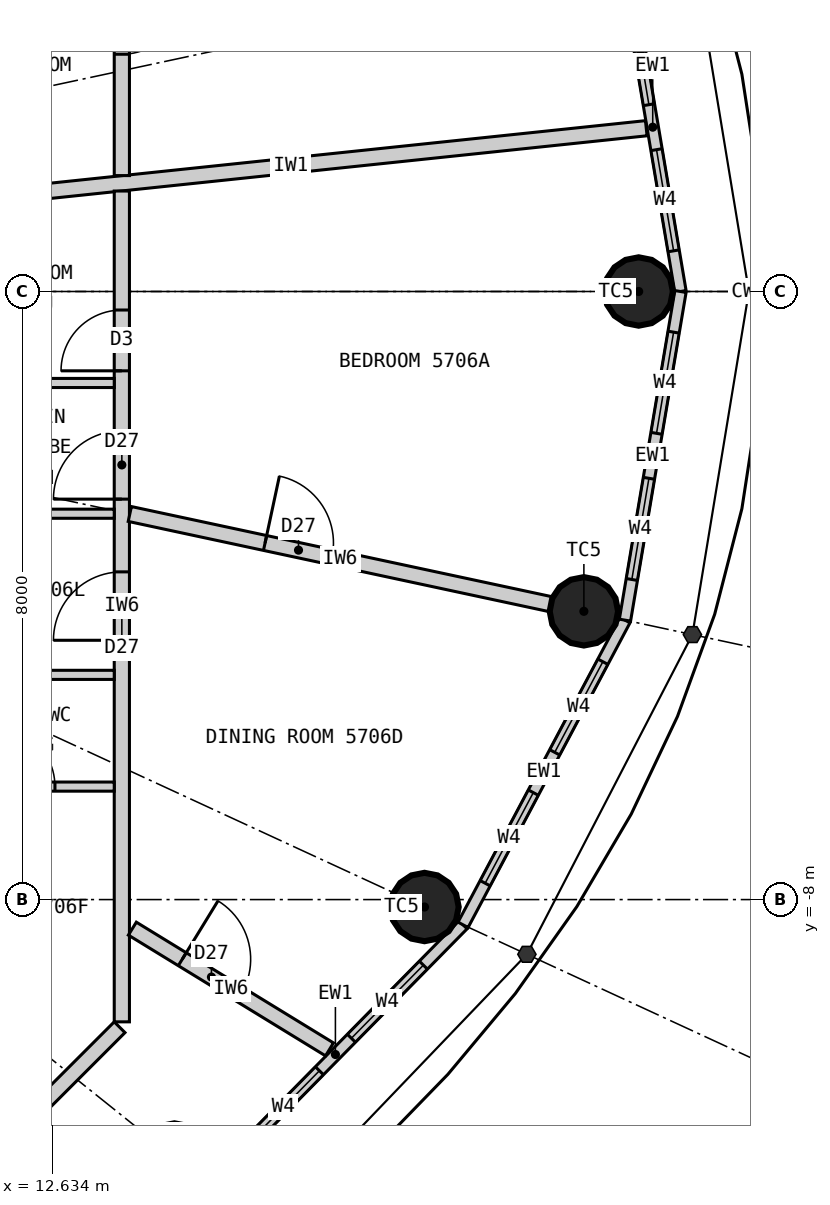
"""IFC4 building model, lengths in metres.
Left out: names, types, materials, properties, quantities, classifications, styles, units other than length and angle.
Written with IfcOpenShell. Run it as: python <this file> out.ifc"""

import sys

from ifc_helpers import new_model, si_unit, direction, frame, frame_2d, origin, origin_2d, place, context, subcontext, project, spatial, rectangle, circle, extrude, element, fill, save


model = new_model("IFC4")
c1 = context("Model", 3, precision=1e-05, world=origin(), true_north=direction((0.0, 1.0)))
c2 = subcontext(c1, "Body", "Model", "MODEL_VIEW")
j1 = project(units=[si_unit("LENGTHUNIT", "METRE"), si_unit("PLANEANGLEUNIT", "RADIAN")], contexts=[c1])
p1 = place(None, origin())
s1 = spatial("IfcSite", under=j1, at=p1, CompositionType="ELEMENT")
p2 = place(p1, origin())
s2 = spatial("IfcBuilding", under=s1, at=p2, CompositionType="ELEMENT")
p3 = place(p2, frame((0.0, 0.0, 212.7)))
s3 = spatial("IfcBuildingStorey", under=s2, at=p3, CompositionType="ELEMENT", Elevation=212.7)
for number, where, z_axis, x_axis in (
    (1, (20.35, 0.0, 0.0), (0.0, 0.0, 1.0), (1.0, 0.0, 0.0)),
    (2, (14.241, -11.393, 0.0), (0.0, 0.0, 1.0), (1.0, 0.0, 0.0)),
    (3, (17.532, -8.098, 0.0), (0.0, 0.0, 1.0), (1.0, 0.0, 0.0)),
    (4, (19.629, -4.208, 0.0), (0.0, 0.0, 1.0), (1.0, 0.0, 0.0)),
):
    element("IfcColumn", number, at=place(p3, frame(where, z_axis=z_axis, x_axis=x_axis)), inside=s3, PredefinedType="COLUMN", context=c2, shape_type="SweptSolid", body=[
        extrude(circle(Radius=0.45, at=origin_2d()), origin(), (0.0, 0.0, 1.0), 3.3),
    ])
p4 = place(p3, frame((20.9, 0.0, 0.0), z_axis=(0.0, 0.0, 1.0), x_axis=(-0.166538513568, 0.986034950445, 0.0)))
e5 = element("IfcWall", 5, at=p4, inside=s3, PredefinedType="ELEMENTEDWALL", context=c2, shape_type="SweptSolid", body=[
    extrude(rectangle(XDim=4.385, YDim=0.15, at=frame_2d((2.192, 0.0))), origin(), (0.0, 0.0, 1.0), 3.12),
])
p5 = place(p4, frame((0.542, 0.0, 0.9)))
e6 = element("IfcOpeningElement", 6, at=p5, cuts=e5, PredefinedType="OPENING", context=c2, shape_type="SweptSolid", body=[
    extrude(rectangle(XDim=1.35, YDim=1.9, at=frame_2d((0.675, 0.95))), frame((0.0, 0.085, 0.0), z_axis=(0.0, -1.0, 0.0), x_axis=(1.0, 0.0, 0.0)), (0.0, 0.0, 1.0), 0.17),
])
p6 = place(p4, frame((2.492, 0.0, 0.9)))
e7 = element("IfcOpeningElement", 7, at=p6, cuts=e5, PredefinedType="OPENING", context=c2, shape_type="SweptSolid", body=[
    extrude(rectangle(XDim=1.35, YDim=1.9, at=frame_2d((0.675, 0.95))), frame((0.0, 0.085, 0.0), z_axis=(0.0, -1.0, 0.0), x_axis=(1.0, 0.0, 0.0)), (0.0, 0.0, 1.0), 0.17),
])
p7 = place(p3, frame((14.68, -11.744, 0.0), z_axis=(0.0, 0.0, 1.0), x_axis=(0.701527379618, 0.712642501993, 0.0)))
e8 = element("IfcWall", 8, at=p7, inside=s3, PredefinedType="ELEMENTEDWALL", context=c2, shape_type="SweptSolid", body=[
    extrude(rectangle(XDim=4.788, YDim=0.15, at=frame_2d((2.394, 0.0))), origin(), (0.0, 0.0, 1.0), 3.12),
])
p8 = place(p7, frame((0.744, 0.0, 0.9)))
e9 = element("IfcOpeningElement", 9, at=p8, cuts=e8, PredefinedType="OPENING", context=c2, shape_type="SweptSolid", body=[
    extrude(rectangle(XDim=1.35, YDim=1.9, at=frame_2d((0.675, 0.95))), frame((0.0, 0.085, 0.0), z_axis=(0.0, -1.0, 0.0), x_axis=(1.0, 0.0, 0.0)), (0.0, 0.0, 1.0), 0.17),
])
p9 = place(p7, frame((2.694, 0.0, 0.9)))
e10 = element("IfcOpeningElement", 10, at=p9, cuts=e8, PredefinedType="OPENING", context=c2, shape_type="SweptSolid", body=[
    extrude(rectangle(XDim=1.35, YDim=1.9, at=frame_2d((0.675, 0.95))), frame((0.0, 0.085, 0.0), z_axis=(0.0, -1.0, 0.0), x_axis=(1.0, 0.0, 0.0)), (0.0, 0.0, 1.0), 0.17),
])
p10 = place(p3, frame((18.04, -8.332, 0.0), z_axis=(0.0, 0.0, 1.0), x_axis=(0.469256152955, 0.883062094597, 0.0)))
e11 = element("IfcWall", 11, at=p10, inside=s3, PredefinedType="ELEMENTEDWALL", context=c2, shape_type="SweptSolid", body=[
    extrude(rectangle(XDim=4.539, YDim=0.15, at=frame_2d((2.27, 0.0))), origin(), (0.0, 0.0, 1.0), 3.12),
])
p11 = place(p10, frame((0.62, 0.0, 0.9)))
e12 = element("IfcOpeningElement", 12, at=p11, cuts=e11, PredefinedType="OPENING", context=c2, shape_type="SweptSolid", body=[
    extrude(rectangle(XDim=1.35, YDim=1.9, at=frame_2d((0.675, 0.95))), frame((0.0, 0.085, 0.0), z_axis=(0.0, -1.0, 0.0), x_axis=(1.0, 0.0, 0.0)), (0.0, 0.0, 1.0), 0.17),
])
p12 = place(p10, frame((2.57, 0.0, 0.9)))
e13 = element("IfcOpeningElement", 13, at=p12, cuts=e11, PredefinedType="OPENING", context=c2, shape_type="SweptSolid", body=[
    extrude(rectangle(XDim=1.35, YDim=1.9, at=frame_2d((0.675, 0.95))), frame((0.0, 0.085, 0.0), z_axis=(0.0, -1.0, 0.0), x_axis=(1.0, 0.0, 0.0)), (0.0, 0.0, 1.0), 0.17),
])
p13 = place(p3, frame((20.17, -4.323, 0.0), z_axis=(0.0, 0.0, 1.0), x_axis=(0.166538513568, 0.986034950445, 0.0)))
e14 = element("IfcWall", 14, at=p13, inside=s3, PredefinedType="ELEMENTEDWALL", context=c2, shape_type="SweptSolid", body=[
    extrude(rectangle(XDim=4.385, YDim=0.15, at=frame_2d((2.192, 0.0))), origin(), (0.0, 0.0, 1.0), 3.12),
])
p14 = place(p13, frame((0.542, 0.0, 0.9)))
e15 = element("IfcOpeningElement", 15, at=p14, cuts=e14, PredefinedType="OPENING", context=c2, shape_type="SweptSolid", body=[
    extrude(rectangle(XDim=1.35, YDim=1.9, at=frame_2d((0.675, 0.95))), frame((0.0, 0.085, 0.0), z_axis=(0.0, -1.0, 0.0), x_axis=(1.0, 0.0, 0.0)), (0.0, 0.0, 1.0), 0.17),
])
p15 = place(p13, frame((2.492, 0.0, 0.9)))
e16 = element("IfcOpeningElement", 16, at=p15, cuts=e14, PredefinedType="OPENING", context=c2, shape_type="SweptSolid", body=[
    extrude(rectangle(XDim=1.35, YDim=1.9, at=frame_2d((0.675, 0.95))), frame((0.0, 0.085, 0.0), z_axis=(0.0, -1.0, 0.0), x_axis=(1.0, 0.0, 0.0)), (0.0, 0.0, 1.0), 0.17),
])
p16 = place(p3, frame((11.1, 1.166, 0.0), z_axis=(0.0, 0.0, 1.0), x_axis=(0.994527487125, 0.104475247564, 0.0)))
e17 = element("IfcWall", 17, at=p16, inside=s3, PredefinedType="PARTITIONING", context=c2, shape_type="SweptSolid", body=[
    extrude(rectangle(XDim=9.401, YDim=0.2, at=frame_2d((4.701, 0.0))), origin(), (0.0, 0.0, 1.0), 2.47),
])
p17 = place(p3, frame((13.55, 1.525, 0.0), z_axis=(0.0, 0.0, 1.0), x_axis=(0.0, 1.0, 0.0)))
e18 = element("IfcWall", 18, at=p17, inside=s3, PredefinedType="PARTITIONING", context=c2, shape_type="SweptSolid", body=[
    extrude(rectangle(XDim=8.084, YDim=0.2, at=frame_2d((4.042, 0.0))), origin(), (0.0, 0.0, 1.0), 3.12),
])
p18 = place(p17, frame((1.597, 0.0, 0.0)))
e19 = element("IfcOpeningElement", 19, at=p18, cuts=e18, PredefinedType="OPENING", context=c2, shape_type="SweptSolid", body=[
    extrude(rectangle(XDim=0.8, YDim=2.1, at=frame_2d((0.4, 1.05))), frame((0.0, 0.11, 0.0), z_axis=(0.0, -1.0, 0.0), x_axis=(1.0, 0.0, 0.0)), (0.0, 0.0, 1.0), 0.22),
])
p19 = place(p17, frame((3.57, 0.0, 0.0)))
e20 = element("IfcOpeningElement", 20, at=p19, cuts=e18, PredefinedType="OPENING", context=c2, shape_type="SweptSolid", body=[
    extrude(rectangle(XDim=0.9, YDim=2.1, at=frame_2d((0.45, 1.05))), frame((0.0, 0.11, 0.0), z_axis=(0.0, -1.0, 0.0), x_axis=(1.0, 0.0, 0.0)), (0.0, 0.0, 1.0), 0.22),
])
p20 = place(p3, frame((10.679, -12.521, 0.0), z_axis=(0.0, 0.0, 1.0), x_axis=(0.707106781187, 0.707106781187, 0.0)))
e21 = element("IfcWall", 21, at=p20, inside=s3, PredefinedType="PARTITIONING", context=c2, shape_type="SweptSolid", body=[
    extrude(rectangle(XDim=4.019, YDim=0.2, at=frame_2d((2.009, 0.0))), origin(), (0.0, 0.0, 1.0), 3.12),
])
p21 = place(p3, frame((13.55, -9.609, 0.0), z_axis=(0.0, 0.0, 1.0), x_axis=(0.0, 1.0, 0.0)))
e22 = element("IfcWall", 22, at=p21, inside=s3, PredefinedType="PARTITIONING", context=c2, shape_type="SweptSolid", body=[
    extrude(rectangle(XDim=10.93, YDim=0.2, at=frame_2d((5.465, 0.0))), origin(), (0.0, 0.0, 1.0), 3.12),
])
p22 = place(p21, frame((5.02, 0.0, 0.0)))
e23 = element("IfcOpeningElement", 23, at=p22, cuts=e22, PredefinedType="OPENING", context=c2, shape_type="SweptSolid", body=[
    extrude(rectangle(XDim=0.9, YDim=2.1, at=frame_2d((0.45, 1.05))), frame((0.0, 0.11, 0.0), z_axis=(0.0, -1.0, 0.0), x_axis=(1.0, 0.0, 0.0)), (0.0, 0.0, 1.0), 0.22),
])
p23 = place(p21, frame((6.877, 0.0, 0.0)))
e24 = element("IfcOpeningElement", 24, at=p23, cuts=e22, PredefinedType="OPENING", context=c2, shape_type="SweptSolid", body=[
    extrude(rectangle(XDim=0.9, YDim=2.1, at=frame_2d((0.45, 1.05))), frame((0.0, 0.11, 0.0), z_axis=(0.0, -1.0, 0.0), x_axis=(1.0, 0.0, 0.0)), (0.0, 0.0, 1.0), 0.22),
])
p24 = place(p21, frame((8.565, 0.0, 0.0)))
e25 = element("IfcOpeningElement", 25, at=p24, cuts=e22, PredefinedType="OPENING", context=c2, shape_type="SweptSolid", body=[
    extrude(rectangle(XDim=0.8, YDim=2.1, at=frame_2d((0.4, 1.05))), frame((0.0, 0.11, 0.0), z_axis=(0.0, -1.0, 0.0), x_axis=(1.0, 0.0, 0.0)), (0.0, 0.0, 1.0), 0.22),
])
p25 = place(p3, frame((13.688, -8.382, 0.0), z_axis=(0.0, 0.0, 1.0), x_axis=(0.852783459586, -0.522264656144, 0.0)))
e26 = element("IfcWall", 26, at=p25, inside=s3, PredefinedType="PARTITIONING", context=c2, shape_type="SweptSolid", body=[
    extrude(rectangle(XDim=3.042, YDim=0.2, at=frame_2d((1.521, 0.0))), origin(), (0.0, 0.0, 1.0), 3.12),
])
p26 = place(p25, frame((0.77, 0.0, 0.0)))
e27 = element("IfcOpeningElement", 27, at=p26, cuts=e26, PredefinedType="OPENING", context=c2, shape_type="SweptSolid", body=[
    extrude(rectangle(XDim=0.9, YDim=2.1, at=frame_2d((0.45, 1.05))), frame((0.0, 0.11, 0.0), z_axis=(0.0, -1.0, 0.0), x_axis=(1.0, 0.0, 0.0)), (0.0, 0.0, 1.0), 0.22),
])
p27 = place(p3, frame((13.655, -2.927, 0.0), z_axis=(0.0, 0.0, 1.0), x_axis=(0.977790419294, -0.209585056568, 0.0)))
e28 = element("IfcWall", 28, at=p27, inside=s3, PredefinedType="PARTITIONING", context=c2, shape_type="SweptSolid", body=[
    extrude(rectangle(XDim=5.66, YDim=0.2, at=frame_2d((2.83, 0.0))), origin(), (0.0, 0.0, 1.0), 2.42),
])
p28 = place(p27, frame((1.82, 0.0, 0.0)))
e29 = element("IfcOpeningElement", 29, at=p28, cuts=e28, PredefinedType="OPENING", context=c2, shape_type="SweptSolid", body=[
    extrude(rectangle(XDim=0.9, YDim=2.1, at=frame_2d((0.45, 1.05))), frame((0.0, 0.11, 0.0), z_axis=(0.0, -1.0, 0.0), x_axis=(1.0, 0.0, 0.0)), (0.0, 0.0, 1.0), 0.22),
])
p29 = place(p3, frame((11.1, -6.514, 0.0), z_axis=(0.0, 0.0, 1.0), x_axis=(1.0, 0.0, 0.0)))
e30 = element("IfcWall", 30, at=p29, inside=s3, PredefinedType="PARTITIONING", context=c2, shape_type="SweptSolid", body=[
    extrude(rectangle(XDim=2.35, YDim=0.12, at=frame_2d((1.175, 0.0))), origin(), (0.0, 0.0, 1.0), 3.12),
])
p30 = place(p29, frame((0.77, 0.0, 0.0)))
e31 = element("IfcOpeningElement", 31, at=p30, cuts=e30, PredefinedType="OPENING", context=c2, shape_type="SweptSolid", body=[
    extrude(rectangle(XDim=0.8, YDim=2.1, at=frame_2d((0.4, 1.05))), frame((0.0, 0.07, 0.0), z_axis=(0.0, -1.0, 0.0), x_axis=(1.0, 0.0, 0.0)), (0.0, 0.0, 1.0), 0.14),
])
p31 = place(p3, frame((11.1, -5.044, 0.0), z_axis=(0.0, 0.0, 1.0), x_axis=(1.0, 0.0, 0.0)))
e32 = element("IfcWall", 32, at=p31, inside=s3, PredefinedType="PARTITIONING", context=c2, shape_type="SweptSolid", body=[
    extrude(rectangle(XDim=2.35, YDim=0.12, at=frame_2d((1.175, 0.0))), origin(), (0.0, 0.0, 1.0), 3.12),
])
p32 = place(p3, frame((11.1, -2.924, 0.0), z_axis=(0.0, 0.0, 1.0), x_axis=(1.0, 0.0, 0.0)))
e33 = element("IfcWall", 33, at=p32, inside=s3, PredefinedType="PARTITIONING", context=c2, shape_type="SweptSolid", body=[
    extrude(rectangle(XDim=2.35, YDim=0.12, at=frame_2d((1.175, 0.0))), origin(), (0.0, 0.0, 1.0), 2.42),
])
p33 = place(p3, frame((11.1, -1.204, 0.0), z_axis=(0.0, 0.0, 1.0), x_axis=(1.0, 0.0, 0.0)))
e34 = element("IfcWall", 34, at=p33, inside=s3, PredefinedType="PARTITIONING", context=c2, shape_type="SweptSolid", body=[
    extrude(rectangle(XDim=2.35, YDim=0.12, at=frame_2d((1.175, 0.0))), origin(), (0.0, 0.0, 1.0), 3.12),
])
p34 = place(p5, origin())
e35 = element("IfcWindow", 35, at=p34, inside=s3, PartitioningType="SINGLE_PANEL", PredefinedType="WINDOW", context=c2, shape_type="SweptSolid", body=[
    extrude(rectangle(XDim=1.35, YDim=1.9, at=frame_2d((0.675, 0.95))), frame((0.0, 0.03, 0.0), z_axis=(0.0, -1.0, 0.0), x_axis=(1.0, 0.0, 0.0)), (0.0, 0.0, 1.0), 0.06),
])
fill(e6, e35)
p35 = place(p6, origin())
e36 = element("IfcWindow", 36, at=p35, inside=s3, PartitioningType="SINGLE_PANEL", PredefinedType="WINDOW", context=c2, shape_type="SweptSolid", body=[
    extrude(rectangle(XDim=1.35, YDim=1.9, at=frame_2d((0.675, 0.95))), frame((0.0, 0.03, 0.0), z_axis=(0.0, -1.0, 0.0), x_axis=(1.0, 0.0, 0.0)), (0.0, 0.0, 1.0), 0.06),
])
fill(e7, e36)
p36 = place(p8, origin())
e37 = element("IfcWindow", 37, at=p36, inside=s3, PartitioningType="SINGLE_PANEL", PredefinedType="WINDOW", context=c2, shape_type="SweptSolid", body=[
    extrude(rectangle(XDim=1.35, YDim=1.9, at=frame_2d((0.675, 0.95))), frame((0.0, 0.03, 0.0), z_axis=(0.0, -1.0, 0.0), x_axis=(1.0, 0.0, 0.0)), (0.0, 0.0, 1.0), 0.06),
])
fill(e9, e37)
p37 = place(p9, origin())
e38 = element("IfcWindow", 38, at=p37, inside=s3, PartitioningType="SINGLE_PANEL", PredefinedType="WINDOW", context=c2, shape_type="SweptSolid", body=[
    extrude(rectangle(XDim=1.35, YDim=1.9, at=frame_2d((0.675, 0.95))), frame((0.0, 0.03, 0.0), z_axis=(0.0, -1.0, 0.0), x_axis=(1.0, 0.0, 0.0)), (0.0, 0.0, 1.0), 0.06),
])
fill(e10, e38)
p38 = place(p11, origin())
e39 = element("IfcWindow", 39, at=p38, inside=s3, PartitioningType="SINGLE_PANEL", PredefinedType="WINDOW", context=c2, shape_type="SweptSolid", body=[
    extrude(rectangle(XDim=1.35, YDim=1.9, at=frame_2d((0.675, 0.95))), frame((0.0, 0.03, 0.0), z_axis=(0.0, -1.0, 0.0), x_axis=(1.0, 0.0, 0.0)), (0.0, 0.0, 1.0), 0.06),
])
fill(e12, e39)
p39 = place(p12, origin())
e40 = element("IfcWindow", 40, at=p39, inside=s3, PartitioningType="SINGLE_PANEL", PredefinedType="WINDOW", context=c2, shape_type="SweptSolid", body=[
    extrude(rectangle(XDim=1.35, YDim=1.9, at=frame_2d((0.675, 0.95))), frame((0.0, 0.03, 0.0), z_axis=(0.0, -1.0, 0.0), x_axis=(1.0, 0.0, 0.0)), (0.0, 0.0, 1.0), 0.06),
])
fill(e13, e40)
p40 = place(p14, origin())
e41 = element("IfcWindow", 41, at=p40, inside=s3, PartitioningType="SINGLE_PANEL", PredefinedType="WINDOW", context=c2, shape_type="SweptSolid", body=[
    extrude(rectangle(XDim=1.35, YDim=1.9, at=frame_2d((0.675, 0.95))), frame((0.0, 0.03, 0.0), z_axis=(0.0, -1.0, 0.0), x_axis=(1.0, 0.0, 0.0)), (0.0, 0.0, 1.0), 0.06),
])
fill(e15, e41)
p41 = place(p15, origin())
e42 = element("IfcWindow", 42, at=p41, inside=s3, PartitioningType="SINGLE_PANEL", PredefinedType="WINDOW", context=c2, shape_type="SweptSolid", body=[
    extrude(rectangle(XDim=1.35, YDim=1.9, at=frame_2d((0.675, 0.95))), frame((0.0, 0.03, 0.0), z_axis=(0.0, -1.0, 0.0), x_axis=(1.0, 0.0, 0.0)), (0.0, 0.0, 1.0), 0.06),
])
fill(e16, e42)
p42 = place(p18, origin())
e43 = element("IfcDoor", 43, at=p42, inside=s3, OperationType="SINGLE_SWING_RIGHT", PredefinedType="DOOR", context=c2, shape_type="SweptSolid", body=[
    extrude(rectangle(XDim=0.8, YDim=2.1, at=frame_2d((0.4, 1.05))), frame((0.0, 0.025, 0.0), z_axis=(0.0, -1.0, 0.0), x_axis=(1.0, 0.0, 0.0)), (0.0, 0.0, 1.0), 0.05),
])
fill(e19, e43)
p43 = place(p30, origin())
e44 = element("IfcDoor", 44, at=p43, inside=s3, OperationType="SINGLE_SWING_LEFT", PredefinedType="DOOR", context=c2, shape_type="SweptSolid", body=[
    extrude(rectangle(XDim=0.8, YDim=2.1, at=frame_2d((0.4, 1.05))), frame((0.0, 0.025, 0.0), z_axis=(0.0, -1.0, 0.0), x_axis=(1.0, 0.0, 0.0)), (0.0, 0.0, 1.0), 0.05),
])
fill(e31, e44)
p44 = place(p22, origin())
e45 = element("IfcDoor", 45, at=p44, inside=s3, OperationType="SINGLE_SWING_LEFT", PredefinedType="DOOR", context=c2, shape_type="SweptSolid", body=[
    extrude(rectangle(XDim=0.9, YDim=2.1, at=frame_2d((0.45, 1.05))), frame((0.0, 0.025, 0.0), z_axis=(0.0, -1.0, 0.0), x_axis=(1.0, 0.0, 0.0)), (0.0, 0.0, 1.0), 0.05),
])
fill(e23, e45)
p45 = place(p23, origin())
e46 = element("IfcDoor", 46, at=p45, inside=s3, OperationType="SINGLE_SWING_LEFT", PredefinedType="DOOR", context=c2, shape_type="SweptSolid", body=[
    extrude(rectangle(XDim=0.9, YDim=2.1, at=frame_2d((0.45, 1.05))), frame((0.0, 0.025, 0.0), z_axis=(0.0, -1.0, 0.0), x_axis=(1.0, 0.0, 0.0)), (0.0, 0.0, 1.0), 0.05),
])
fill(e24, e46)
p46 = place(p24, origin())
e47 = element("IfcDoor", 47, at=p46, inside=s3, OperationType="SINGLE_SWING_LEFT", PredefinedType="DOOR", context=c2, shape_type="SweptSolid", body=[
    extrude(rectangle(XDim=0.8, YDim=2.1, at=frame_2d((0.4, 1.05))), frame((0.0, 0.025, 0.0), z_axis=(0.0, -1.0, 0.0), x_axis=(1.0, 0.0, 0.0)), (0.0, 0.0, 1.0), 0.05),
])
fill(e25, e47)
p47 = place(p26, origin())
e48 = element("IfcDoor", 48, at=p47, inside=s3, OperationType="SINGLE_SWING_LEFT", PredefinedType="DOOR", context=c2, shape_type="SweptSolid", body=[
    extrude(rectangle(XDim=0.9, YDim=2.1, at=frame_2d((0.45, 1.05))), frame((0.0, 0.025, 0.0), z_axis=(0.0, -1.0, 0.0), x_axis=(1.0, 0.0, 0.0)), (0.0, 0.0, 1.0), 0.05),
])
fill(e27, e48)
p48 = place(p28, origin())
e49 = element("IfcDoor", 49, at=p48, inside=s3, OperationType="SINGLE_SWING_LEFT", PredefinedType="DOOR", context=c2, shape_type="SweptSolid", body=[
    extrude(rectangle(XDim=0.9, YDim=2.1, at=frame_2d((0.45, 1.05))), frame((0.0, 0.025, 0.0), z_axis=(0.0, -1.0, 0.0), x_axis=(1.0, 0.0, 0.0)), (0.0, 0.0, 1.0), 0.05),
])
fill(e29, e49)
save(model, sys.argv[1])
